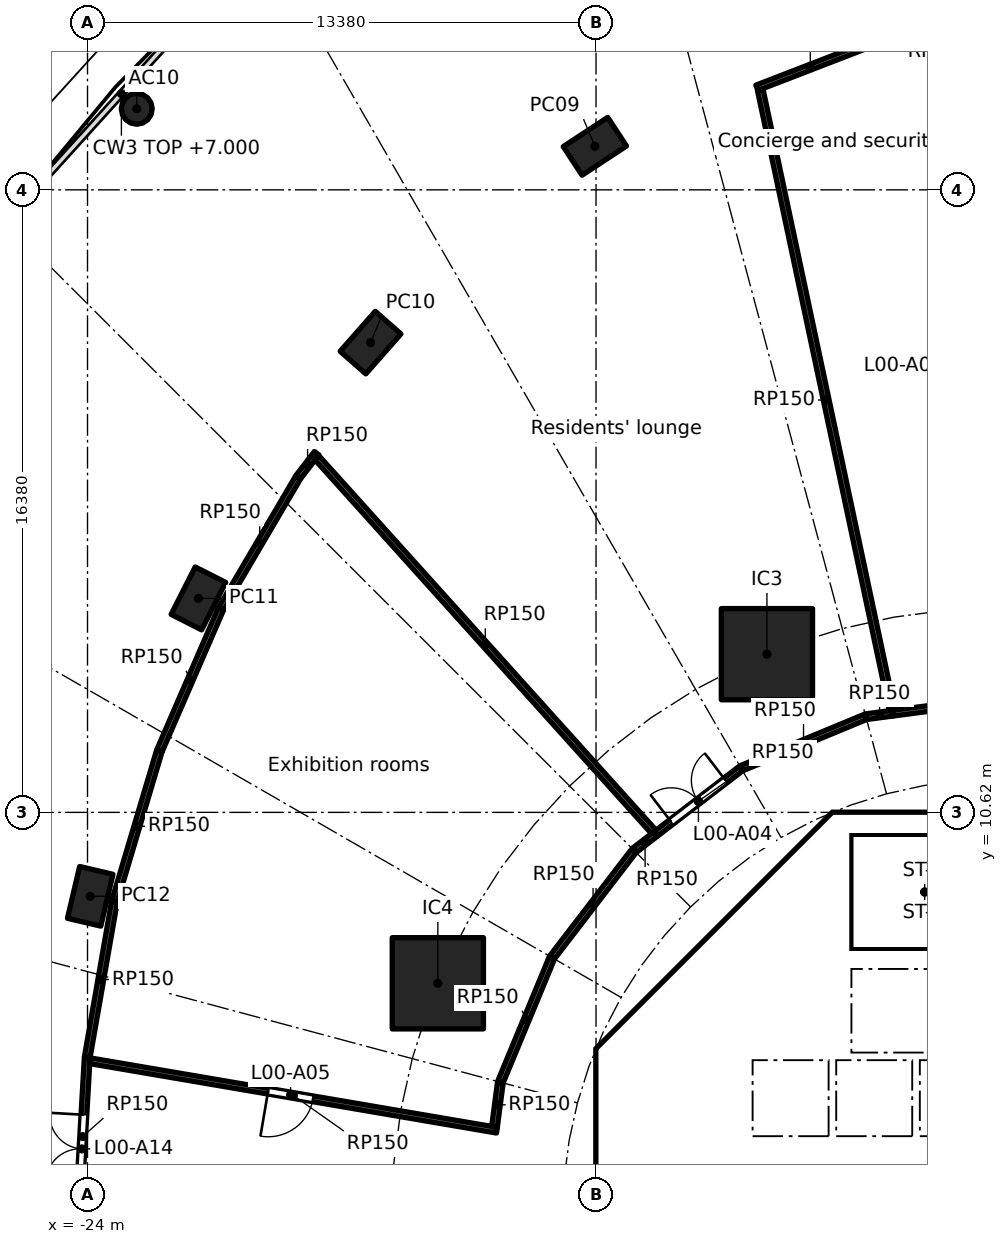
"""IFC4 building model, lengths in metres.
Left out: names, types, materials, properties, quantities, classifications, styles, units other than length and angle.
Written with IfcOpenShell. Run it as: python <this file> out.ifc"""

import sys

from ifc_helpers import new_model, si_unit, direction, frame, frame_2d, origin, origin_2d, place, context, subcontext, project, spatial, polyline, rectangle, hollow_rectangle, hollow_circle, outline, extrude, element, fill, save


model = new_model("IFC4")
c1 = context("Model", 3, precision=1e-05, world=origin(), true_north=direction((0.0, 1.0)))
c2 = subcontext(c1, "Body", "Model", "MODEL_VIEW")
j1 = project(units=[si_unit("LENGTHUNIT", "METRE"), si_unit("PLANEANGLEUNIT", "RADIAN")], contexts=[c1])
p1 = place(None, origin())
s1 = spatial("IfcSite", under=j1, at=p1, CompositionType="ELEMENT")
p2 = place(p1, origin())
s2 = spatial("IfcBuilding", under=s1, at=p2, CompositionType="ELEMENT")
p3 = place(p2, origin())
s3 = spatial("IfcBuildingStorey", under=s2, at=p3, CompositionType="ELEMENT", Elevation=0.0)
for number, where, z_axis, x_axis in (
    (1, (-10.65, 28.146, 0.0), (0.0, 0.0, 1.0), (-0.836, -0.549, 0.0)),
    (2, (-16.552, 22.981, 0.0), (0.0, 0.0, 1.0), (-0.66, -0.751, 0.0)),
    (3, (-21.082, 16.25, 0.0), (0.0, 0.0, 1.0), (-0.452, -0.892, 0.0)),
    (4, (-23.929, 8.412, 0.0), (0.0, 0.0, 1.0), (-0.229, -0.973, 0.0)),
):
    element("IfcColumn", number, at=place(p3, frame(where, z_axis=z_axis, x_axis=x_axis)), inside=s3, PredefinedType="COLUMN", context=c2, shape_type="SweptSolid", body=[
        extrude(hollow_rectangle(XDim=1.4, YDim=0.9, WallThickness=0.05, at=origin_2d()), origin(), (0.0, 0.0, 1.0), 7.0),
    ])
for number, where, z_axis, x_axis in (
    (5, (-6.123, 14.782, 0.0), (0.0, 0.0, 1.0), (1.0, 0.0, 0.0)),
    (6, (-14.782, 6.123, 0.0), (0.0, 0.0, 1.0), (1.0, 0.0, 0.0)),
):
    element("IfcColumn", number, at=place(p3, frame(where, z_axis=z_axis, x_axis=x_axis)), inside=s3, PredefinedType="COLUMN", context=c2, shape_type="SweptSolid", body=[
        extrude(rectangle(XDim=2.4, YDim=2.4, at=origin_2d()), origin(), (0.0, 0.0, 1.0), 7.0),
    ])
p4 = place(p3, frame((-22.704, 29.133, 0.0), z_axis=(0.0, 0.0, 1.0), x_axis=(1.0, 0.0, 0.0)))
e7 = element("IfcColumn", 7, at=p4, inside=s3, PredefinedType="COLUMN", context=c2, shape_type="SweptSolid", body=[
    extrude(hollow_circle(Radius=0.406, WallThickness=0.025, at=origin_2d()), origin(), (0.0, 0.0, 1.0), 7.0),
])
p5 = place(p3, frame((3.801, 10.325, 0.0), z_axis=(0.0, 0.0, 1.0), x_axis=(-1.0, 0.0, 0.0)))
e8 = element("IfcWall", 8, at=p5, inside=s3, PredefinedType="SHEAR", context=c2, shape_type="SweptSolid", body=[
    extrude(rectangle(XDim=7.602, YDim=0.6, at=frame_2d((3.801, 0.0))), origin(), (0.0, 0.0, 1.0), 6.7),
])
p6 = place(p5, frame((0.151, 0.0, 0.0)))
e9 = element("IfcOpeningElement", 9, at=p6, cuts=e8, PredefinedType="OPENING", context=c2, shape_type="SweptSolid", body=[
    extrude(rectangle(XDim=1.1, YDim=2.1, at=frame_2d((0.55, 1.05))), frame((0.0, 0.31, 0.0), z_axis=(0.0, -1.0, 0.0), x_axis=(1.0, 0.0, 0.0)), (0.0, 0.0, 1.0), 0.62),
])
p7 = place(p3, frame((-4.613, 9.988, 0.0), z_axis=(0.0, 0.0, 1.0), x_axis=(-0.707106781187, -0.707106781187, 0.0)))
e10 = element("IfcWall", 10, at=p7, inside=s3, PredefinedType="SHEAR", context=c2, shape_type="SweptSolid", body=[
    extrude(rectangle(XDim=7.602, YDim=0.6, at=frame_2d((3.801, 0.0))), origin(), (0.0, 0.0, 1.0), 6.7),
])
p8 = place(p7, frame((0.351, 0.0, 0.0)))
e11 = element("IfcOpeningElement", 11, at=p8, cuts=e10, PredefinedType="OPENING", context=c2, shape_type="SweptSolid", body=[
    extrude(rectangle(XDim=1.1, YDim=2.1, at=frame_2d((0.55, 1.05))), frame((0.0, 0.31, 0.0), z_axis=(0.0, -1.0, 0.0), x_axis=(1.0, 0.0, 0.0)), (0.0, 0.0, 1.0), 0.62),
])
p9 = place(p3, frame((-10.325, 3.801, 0.0), z_axis=(0.0, 0.0, 1.0), x_axis=(0.0, -1.0, 0.0)))
e12 = element("IfcWall", 12, at=p9, inside=s3, PredefinedType="SHEAR", context=c2, shape_type="SweptSolid", body=[
    extrude(rectangle(XDim=7.602, YDim=0.6, at=frame_2d((3.801, 0.0))), origin(), (0.0, 0.0, 1.0), 6.7),
])
p10 = place(p9, frame((0.651, 0.0, 0.0)))
e13 = element("IfcOpeningElement", 13, at=p10, cuts=e12, PredefinedType="OPENING", context=c2, shape_type="SweptSolid", body=[
    extrude(rectangle(XDim=1.5, YDim=2.1, at=frame_2d((0.75, 1.05))), frame((0.0, 0.31, 0.0), z_axis=(0.0, -1.0, 0.0), x_axis=(1.0, 0.0, 0.0)), (0.0, 0.0, 1.0), 0.62),
])
p11 = place(p9, frame((5.451, 0.0, 0.0)))
e14 = element("IfcOpeningElement", 14, at=p11, cuts=e12, PredefinedType="OPENING", context=c2, shape_type="SweptSolid", body=[
    extrude(rectangle(XDim=1.5, YDim=2.1, at=frame_2d((0.75, 1.05))), frame((0.0, 0.31, 0.0), z_axis=(0.0, -1.0, 0.0), x_axis=(1.0, 0.0, 0.0)), (0.0, 0.0, 1.0), 0.62),
])
p12 = place(p3, frame((-5.8, 4.3, 0.0), z_axis=(0.0, 0.0, 1.0), x_axis=(0.0, 1.0, 0.0)))
e15 = element("IfcWall", 15, at=p12, inside=s3, PredefinedType="PARTITIONING", context=c2, shape_type="SweptSolid", body=[
    extrude(rectangle(XDim=3.927, YDim=0.15, at=frame_2d((1.963, 0.0))), origin(), (0.0, 0.0, 1.0), 6.7),
])
p13 = place(p12, frame((1.551, 0.0, 0.0)))
e16 = element("IfcOpeningElement", 16, at=p13, cuts=e15, PredefinedType="OPENING", context=c2, shape_type="SweptSolid", body=[
    extrude(rectangle(XDim=0.9, YDim=2.1, at=frame_2d((0.45, 1.05))), frame((0.0, 0.085, 0.0), z_axis=(0.0, -1.0, 0.0), x_axis=(1.0, 0.0, 0.0)), (0.0, 0.0, 1.0), 0.17),
])
p14 = place(p3, frame((-4.0, 4.3, 0.0), z_axis=(0.0, 0.0, 1.0), x_axis=(0.0, 1.0, 0.0)))
e17 = element("IfcWall", 17, at=p14, inside=s3, PredefinedType="SOLIDWALL", context=c2, shape_type="SweptSolid", body=[
    extrude(rectangle(XDim=2.2, YDim=0.2, at=frame_2d((1.1, 0.0))), origin(), (0.0, 0.0, 1.0), 6.7),
])
p15 = place(p14, frame((0.55, 0.0, 0.0)))
e18 = element("IfcOpeningElement", 18, at=p15, cuts=e17, PredefinedType="OPENING", context=c2, shape_type="SweptSolid", body=[
    extrude(rectangle(XDim=1.1, YDim=2.1, at=frame_2d((0.55, 1.05))), frame((0.0, 0.11, 0.0), z_axis=(0.0, -1.0, 0.0), x_axis=(1.0, 0.0, 0.0)), (0.0, 0.0, 1.0), 0.22),
])
p16 = place(p3, frame((-6.7, 2.0, 0.0), z_axis=(0.0, 0.0, 1.0), x_axis=(1.0, 0.0, 0.0)))
e19 = element("IfcWall", 19, at=p16, inside=s3, PredefinedType="SOLIDWALL", context=c2, shape_type="SweptSolid", body=[
    extrude(rectangle(XDim=13.4, YDim=0.2, at=frame_2d((6.7, 0.0))), origin(), (0.0, 0.0, 1.0), 6.7),
])
p17 = place(p16, frame((0.65, 0.0, 0.0)))
e20 = element("IfcOpeningElement", 20, at=p17, cuts=e19, PredefinedType="OPENING", context=c2, shape_type="SweptSolid", body=[
    extrude(rectangle(XDim=1.1, YDim=2.1, at=frame_2d((0.55, 1.05))), frame((0.0, 0.11, 0.0), z_axis=(0.0, -1.0, 0.0), x_axis=(1.0, 0.0, 0.0)), (0.0, 0.0, 1.0), 0.22),
])
p18 = place(p16, frame((2.85, 0.0, 0.0)))
e21 = element("IfcOpeningElement", 21, at=p18, cuts=e19, PredefinedType="OPENING", context=c2, shape_type="SweptSolid", body=[
    extrude(rectangle(XDim=1.1, YDim=2.1, at=frame_2d((0.55, 1.05))), frame((0.0, 0.11, 0.0), z_axis=(0.0, -1.0, 0.0), x_axis=(1.0, 0.0, 0.0)), (0.0, 0.0, 1.0), 0.22),
])
p19 = place(p16, frame((5.05, 0.0, 0.0)))
e22 = element("IfcOpeningElement", 22, at=p19, cuts=e19, PredefinedType="OPENING", context=c2, shape_type="SweptSolid", body=[
    extrude(rectangle(XDim=1.1, YDim=2.1, at=frame_2d((0.55, 1.05))), frame((0.0, 0.11, 0.0), z_axis=(0.0, -1.0, 0.0), x_axis=(1.0, 0.0, 0.0)), (0.0, 0.0, 1.0), 0.22),
])
p20 = place(p16, frame((7.25, 0.0, 0.0)))
e23 = element("IfcOpeningElement", 23, at=p20, cuts=e19, PredefinedType="OPENING", context=c2, shape_type="SweptSolid", body=[
    extrude(rectangle(XDim=1.1, YDim=2.1, at=frame_2d((0.55, 1.05))), frame((0.0, 0.11, 0.0), z_axis=(0.0, -1.0, 0.0), x_axis=(1.0, 0.0, 0.0)), (0.0, 0.0, 1.0), 0.22),
])
p21 = place(p16, frame((9.45, 0.0, 0.0)))
e24 = element("IfcOpeningElement", 24, at=p21, cuts=e19, PredefinedType="OPENING", context=c2, shape_type="SweptSolid", body=[
    extrude(rectangle(XDim=1.1, YDim=2.1, at=frame_2d((0.55, 1.05))), frame((0.0, 0.11, 0.0), z_axis=(0.0, -1.0, 0.0), x_axis=(1.0, 0.0, 0.0)), (0.0, 0.0, 1.0), 0.22),
])
p22 = place(p16, frame((11.65, 0.0, 0.0)))
e25 = element("IfcOpeningElement", 25, at=p22, cuts=e19, PredefinedType="OPENING", context=c2, shape_type="SweptSolid", body=[
    extrude(rectangle(XDim=1.1, YDim=2.1, at=frame_2d((0.55, 1.05))), frame((0.0, 0.11, 0.0), z_axis=(0.0, -1.0, 0.0), x_axis=(1.0, 0.0, 0.0)), (0.0, 0.0, 1.0), 0.22),
])
p23 = place(p3, origin())
e26 = element("IfcWall", 26, at=p23, inside=s3, PredefinedType="SHEAR", context=c2, shape_type="SweptSolid", body=[
    extrude(outline(polyline([(-10.2, 4.825), (-9.776, 4.401), (-10.025, 4.152), (-10.025, 3.801), (-10.625, 3.801), (-10.625, 4.401), (-10.2, 4.825)])), origin(), (0.0, 0.0, 1.0), 6.7),
])
p24 = place(p3, origin())
e27 = element("IfcWall", 27, at=p24, inside=s3, PredefinedType="SHEAR", context=c2, shape_type="SweptSolid", body=[
    extrude(outline(polyline([(-3.801, 10.625), (-3.801, 10.025), (-4.152, 10.025), (-4.401, 9.776), (-4.825, 10.2), (-4.401, 10.625), (-3.801, 10.625)])), origin(), (0.0, 0.0, 1.0), 6.7),
])
p25 = place(p3, origin())
e28 = element("IfcWall", 28, at=p25, inside=s3, PredefinedType="SOLIDWALL", context=c2, shape_type="SweptSolid", body=[
    extrude(outline(polyline([(-6.5, 2.1), (-6.7, 2.1), (-6.7, 4.3), (6.7, 4.3), (6.7, 2.1), (6.5, 2.1), (6.5, 4.1), (4.5, 4.1), (4.5, 2.1), (4.3, 2.1), (4.3, 4.1), (2.3, 4.1), (2.3, 2.1), (2.1, 2.1), (2.1, 4.1), (0.1, 4.1), (0.1, 2.1), (-0.1, 2.1), (-0.1, 4.1), (-2.1, 4.1), (-2.1, 2.1), (-2.3, 2.1), (-2.3, 4.1), (-4.3, 4.1), (-4.3, 2.1), (-4.5, 2.1), (-4.5, 4.1), (-6.5, 4.1), (-6.5, 2.1)])), origin(), (0.0, 0.0, 1.0), 6.7),
])
p26 = place(p3, frame((-10.025, 4.0, 0.0), z_axis=(0.0, 0.0, 1.0), x_axis=(1.0, 0.0, 0.0)))
e29 = element("IfcWall", 29, at=p26, inside=s3, PredefinedType="PARTITIONING", context=c2, shape_type="SweptSolid", body=[
    extrude(rectangle(XDim=3.325, YDim=0.2, at=frame_2d((1.662, 0.0))), origin(), (0.0, 0.0, 1.0), 6.7),
])
p27 = place(p3, origin())
e30 = element("IfcWall", 30, at=p27, inside=s3, PredefinedType="SOLIDWALL", context=c2, shape_type="SweptSolid", body=[
    extrude(outline(polyline([(-3.9, 7.025), (-4.1, 7.025), (-4.1, 10.025), (-3.9, 10.025), (-3.9, 7.025)])), origin(), (0.0, 0.0, 1.0), 6.7),
])
p28 = place(p3, origin())
e31 = element("IfcWall", 31, at=p28, inside=s3, PredefinedType="SOLIDWALL", context=c2, shape_type="SweptSolid", body=[
    extrude(outline(polyline([(4.1, 6.5), (-4.1, 6.5), (-4.1, 7.025), (4.1, 7.025), (4.1, 6.5)])), origin(), (0.0, 0.0, 1.0), 6.7),
])
p29 = place(p3, frame((-24.248, 0.006, 0.0), z_axis=(0.0, 0.0, 1.0), x_axis=(0.05750459233, 0.998345241818, 0.0)))
e32 = element("IfcWall", 32, at=p29, inside=s3, PredefinedType="PARTITIONING", context=c2, shape_type="SweptSolid", body=[
    extrude(rectangle(XDim=4.173, YDim=0.15, at=frame_2d((2.087, 0.0))), origin(), (0.0, 0.0, 1.0), 6.7),
])
p30 = place(p29, frame((0.862, 0.0, 0.0)))
e33 = element("IfcOpeningElement", 33, at=p30, cuts=e32, PredefinedType="OPENING", context=c2, shape_type="SweptSolid", body=[
    extrude(rectangle(XDim=1.8, YDim=2.1, at=frame_2d((0.9, 1.05))), frame((0.0, 0.085, 0.0), z_axis=(0.0, -1.0, 0.0), x_axis=(1.0, 0.0, 0.0)), (0.0, 0.0, 1.0), 0.17),
])
p31 = place(p3, frame((-23.938, 4.085, 0.0), z_axis=(0.0, 0.0, 1.0), x_axis=(0.985751332255, -0.168209128636, 0.0)))
e34 = element("IfcWall", 34, at=p31, inside=s3, PredefinedType="PARTITIONING", context=c2, shape_type="SweptSolid", body=[
    extrude(rectangle(XDim=10.865, YDim=0.15, at=frame_2d((5.433, 0.0))), origin(), (0.0, 0.0, 1.0), 6.7),
])
p32 = place(p31, frame((4.757, 0.0, 0.0)))
e35 = element("IfcOpeningElement", 35, at=p32, cuts=e34, PredefinedType="OPENING", context=c2, shape_type="SweptSolid", body=[
    extrude(rectangle(XDim=1.2, YDim=2.1, at=frame_2d((0.6, 1.05))), frame((0.0, 0.085, 0.0), z_axis=(0.0, -1.0, 0.0), x_axis=(1.0, 0.0, 0.0)), (0.0, 0.0, 1.0), 0.17),
])
p33 = place(p3, frame((-24.008, 4.175, 0.0), z_axis=(0.0, 0.0, 1.0), x_axis=(0.172163826112, 0.985068331122, 0.0)))
e36 = element("IfcWall", 36, at=p33, inside=s3, PredefinedType="PARTITIONING", context=c2, shape_type="SweptSolid", body=[
    extrude(rectangle(XDim=4.158, YDim=0.15, at=frame_2d((2.079, 0.0))), origin(), (0.0, 0.0, 1.0), 6.7),
])
p34 = place(p3, frame((-23.289, 8.283, 0.0), z_axis=(0.0, 0.0, 1.0), x_axis=(0.285840471929, 0.958277216993, 0.0)))
e37 = element("IfcWall", 37, at=p34, inside=s3, PredefinedType="PARTITIONING", context=c2, shape_type="SweptSolid", body=[
    extrude(rectangle(XDim=4.117, YDim=0.15, at=frame_2d((2.059, 0.0))), origin(), (0.0, 0.0, 1.0), 6.7),
])
p35 = place(p3, frame((-22.107, 12.24, 0.0), z_axis=(0.0, 0.0, 1.0), x_axis=(0.39758890863, 0.917563654323, 0.0)))
e38 = element("IfcWall", 38, at=p35, inside=s3, PredefinedType="PARTITIONING", context=c2, shape_type="SweptSolid", body=[
    extrude(rectangle(XDim=4.067, YDim=0.15, at=frame_2d((2.034, 0.0))), origin(), (0.0, 0.0, 1.0), 6.7),
])
p36 = place(p3, frame((-20.484, 15.984, 0.0), z_axis=(0.0, 0.0, 1.0), x_axis=(0.50633554765, 0.86233654288, 0.0)))
e39 = element("IfcWall", 39, at=p36, inside=s3, PredefinedType="PARTITIONING", context=c2, shape_type="SweptSolid", body=[
    extrude(rectangle(XDim=4.006, YDim=0.15, at=frame_2d((2.003, 0.0))), origin(), (0.0, 0.0, 1.0), 6.7),
])
p37 = place(p3, frame((-18.448, 19.45, 0.0), z_axis=(0.0, 0.0, 1.0), x_axis=(0.610328517632, 0.792148408169, 0.0)))
e40 = element("IfcWall", 40, at=p37, inside=s3, PredefinedType="PARTITIONING", context=c2, shape_type="SweptSolid", body=[
    extrude(rectangle(XDim=0.783, YDim=0.15, at=frame_2d((0.391, 0.0))), origin(), (0.0, 0.0, 1.0), 6.7),
])
p38 = place(p3, frame((-17.966, 19.953, 0.0), z_axis=(0.0, 0.0, 1.0), x_axis=(0.669125575908, -0.743149354885, 0.0)))
e41 = element("IfcWall", 41, at=p38, inside=s3, PredefinedType="PARTITIONING", context=c2, shape_type="SweptSolid", body=[
    extrude(rectangle(XDim=13.249, YDim=0.15, at=frame_2d((6.624, 0.0))), origin(), (0.0, 0.0, 1.0), 6.7),
])
p39 = place(p3, frame((-13.292, 2.344, 0.0), z_axis=(0.0, 0.0, 1.0), x_axis=(0.130610530264, 0.99143375441, 0.0)))
e42 = element("IfcWall", 42, at=p39, inside=s3, PredefinedType="PARTITIONING", context=c2, shape_type="SweptSolid", body=[
    extrude(rectangle(XDim=1.174, YDim=0.15, at=frame_2d((0.587, 0.0))), origin(), (0.0, 0.0, 1.0), 6.7),
])
p40 = place(p3, frame((-13.132, 3.531, 0.0), z_axis=(0.0, 0.0, 1.0), x_axis=(0.382677866108, 0.923881838111, 0.0)))
e43 = element("IfcWall", 43, at=p40, inside=s3, PredefinedType="PARTITIONING", context=c2, shape_type="SweptSolid", body=[
    extrude(rectangle(XDim=3.527, YDim=0.15, at=frame_2d((1.763, 0.0))), origin(), (0.0, 0.0, 1.0), 6.7),
])
p41 = place(p3, frame((-11.771, 6.809, 0.0), z_axis=(0.0, 0.0, 1.0), x_axis=(0.608736710054, 0.793372307201, 0.0)))
e44 = element("IfcWall", 44, at=p41, inside=s3, PredefinedType="PARTITIONING", context=c2, shape_type="SweptSolid", body=[
    extrude(rectangle(XDim=3.527, YDim=0.15, at=frame_2d((1.763, 0.0))), origin(), (0.0, 0.0, 1.0), 6.7),
])
p42 = place(p3, frame((-9.607, 9.624, 0.0), z_axis=(0.0, 0.0, 1.0), x_axis=(0.793399175387, 0.608701690893, 0.0)))
e45 = element("IfcWall", 45, at=p42, inside=s3, PredefinedType="PARTITIONING", context=c2, shape_type="SweptSolid", body=[
    extrude(rectangle(XDim=0.702, YDim=0.15, at=frame_2d((0.351, 0.0))), origin(), (0.0, 0.0, 1.0), 6.7),
])
p43 = place(p3, frame((-9.05, 10.051, 0.0), z_axis=(0.0, 0.0, 1.0), x_axis=(0.793365630445, 0.608745411834, 0.0)))
e46 = element("IfcWall", 46, at=p43, inside=s3, PredefinedType="PARTITIONING", context=c2, shape_type="SweptSolid", body=[
    extrude(rectangle(XDim=2.825, YDim=0.15, at=frame_2d((1.412, 0.0))), origin(), (0.0, 0.0, 1.0), 6.7),
])
p44 = place(p43, frame((0.518, 0.0, 0.0)))
e47 = element("IfcOpeningElement", 47, at=p44, cuts=e46, PredefinedType="OPENING", context=c2, shape_type="SweptSolid", body=[
    extrude(rectangle(XDim=1.8, YDim=2.1, at=frame_2d((0.9, 1.05))), frame((0.0, 0.085, 0.0), z_axis=(0.0, -1.0, 0.0), x_axis=(1.0, 0.0, 0.0)), (0.0, 0.0, 1.0), 0.17),
])
p45 = place(p3, frame((-6.789, 11.782, 0.0), z_axis=(0.0, 0.0, 1.0), x_axis=(0.923881838111, 0.382677866108, 0.0)))
e48 = element("IfcWall", 48, at=p45, inside=s3, PredefinedType="PARTITIONING", context=c2, shape_type="SweptSolid", body=[
    extrude(rectangle(XDim=3.527, YDim=0.15, at=frame_2d((1.763, 0.0))), origin(), (0.0, 0.0, 1.0), 6.7),
])
p46 = place(p3, frame((-6.386, 29.685, 0.0), z_axis=(0.0, 0.0, 1.0), x_axis=(0.932843334817, 0.360282268074, 0.0)))
e49 = element("IfcWall", 49, at=p46, inside=s3, PredefinedType="PARTITIONING", context=c2, shape_type="SweptSolid", body=[
    extrude(rectangle(XDim=3.012, YDim=0.15, at=frame_2d((1.506, 0.0))), origin(), (0.0, 0.0, 1.0), 6.7),
])
p47 = place(p3, frame((-3.508, 13.138, 0.0), z_axis=(0.0, 0.0, 1.0), x_axis=(0.991460212813, 0.130409533429, 0.0)))
e50 = element("IfcWall", 50, at=p47, inside=s3, PredefinedType="PARTITIONING", context=c2, shape_type="SweptSolid", body=[
    extrude(rectangle(XDim=0.702, YDim=0.15, at=frame_2d((0.351, 0.0))), origin(), (0.0, 0.0, 1.0), 6.7),
])
p48 = place(p3, frame((-2.828, 13.303, 0.0), z_axis=(0.0, 0.0, 1.0), x_axis=(-0.207924325278, 0.978144915111, 0.0)))
e51 = element("IfcWall", 51, at=p48, inside=s3, PredefinedType="PARTITIONING", context=c2, shape_type="SweptSolid", body=[
    extrude(rectangle(XDim=16.699, YDim=0.15, at=frame_2d((8.35, 0.0))), origin(), (0.0, 0.0, 1.0), 6.7),
])
p49 = place(p3, frame((-2.812, 13.23, 0.0), z_axis=(0.0, 0.0, 1.0), x_axis=(0.991442947496, 0.130540728744, 0.0)))
e52 = element("IfcWall", 52, at=p49, inside=s3, PredefinedType="PARTITIONING", context=c2, shape_type="SweptSolid", body=[
    extrude(rectangle(XDim=2.198, YDim=0.15, at=frame_2d((1.099, 0.0))), origin(), (0.0, 0.0, 1.0), 6.7),
])
p50 = place(p17, origin())
e53 = element("IfcDoor", 53, at=p50, inside=s3, OperationType="DOUBLE_DOOR_SLIDING", PredefinedType="DOOR", context=c2, shape_type="SweptSolid", body=[
    extrude(rectangle(XDim=1.1, YDim=2.1, at=frame_2d((0.55, 1.05))), frame((0.0, 0.025, 0.0), z_axis=(0.0, -1.0, 0.0), x_axis=(1.0, 0.0, 0.0)), (0.0, 0.0, 1.0), 0.05),
])
fill(e20, e53)
p51 = place(p18, origin())
e54 = element("IfcDoor", 54, at=p51, inside=s3, OperationType="DOUBLE_DOOR_SLIDING", PredefinedType="DOOR", context=c2, shape_type="SweptSolid", body=[
    extrude(rectangle(XDim=1.1, YDim=2.1, at=frame_2d((0.55, 1.05))), frame((0.0, 0.025, 0.0), z_axis=(0.0, -1.0, 0.0), x_axis=(1.0, 0.0, 0.0)), (0.0, 0.0, 1.0), 0.05),
])
fill(e21, e54)
p52 = place(p15, origin())
e55 = element("IfcDoor", 55, at=p52, inside=s3, OperationType="DOUBLE_DOOR_SLIDING", PredefinedType="DOOR", context=c2, shape_type="SweptSolid", body=[
    extrude(rectangle(XDim=1.1, YDim=2.1, at=frame_2d((0.55, 1.05))), frame((0.0, 0.025, 0.0), z_axis=(0.0, -1.0, 0.0), x_axis=(1.0, 0.0, 0.0)), (0.0, 0.0, 1.0), 0.05),
])
fill(e18, e55)
p53 = place(p13, origin())
e56 = element("IfcDoor", 56, at=p53, inside=s3, OperationType="SINGLE_SWING_RIGHT", PredefinedType="DOOR", context=c2, shape_type="SweptSolid", body=[
    extrude(rectangle(XDim=0.9, YDim=2.1, at=frame_2d((0.45, 1.05))), frame((0.0, 0.025, 0.0), z_axis=(0.0, -1.0, 0.0), x_axis=(1.0, 0.0, 0.0)), (0.0, 0.0, 1.0), 0.05),
])
fill(e16, e56)
p54 = place(p10, origin())
e57 = element("IfcDoor", 57, at=p54, inside=s3, OperationType="DOUBLE_DOOR_SINGLE_SWING", PredefinedType="DOOR", context=c2, shape_type="SweptSolid", body=[
    extrude(rectangle(XDim=1.5, YDim=2.1, at=frame_2d((0.75, 1.05))), frame((0.0, 0.025, 0.0), z_axis=(0.0, -1.0, 0.0), x_axis=(1.0, 0.0, 0.0)), (0.0, 0.0, 1.0), 0.05),
])
fill(e13, e57)
p55 = place(p8, origin())
e58 = element("IfcDoor", 58, at=p55, inside=s3, OperationType="SINGLE_SWING_LEFT", PredefinedType="DOOR", context=c2, shape_type="SweptSolid", body=[
    extrude(rectangle(XDim=1.1, YDim=2.1, at=frame_2d((0.55, 1.05))), frame((0.0, 0.025, 0.0), z_axis=(0.0, -1.0, 0.0), x_axis=(1.0, 0.0, 0.0)), (0.0, 0.0, 1.0), 0.05),
])
fill(e11, e58)
p56 = place(p44, origin())
e59 = element("IfcDoor", 59, at=p56, inside=s3, OperationType="DOUBLE_DOOR_SINGLE_SWING", PredefinedType="DOOR", context=c2, shape_type="SweptSolid", body=[
    extrude(rectangle(XDim=1.8, YDim=2.1, at=frame_2d((0.9, 1.05))), frame((0.0, 0.025, 0.0), z_axis=(0.0, -1.0, 0.0), x_axis=(1.0, 0.0, 0.0)), (0.0, 0.0, 1.0), 0.05),
])
fill(e47, e59)
p57 = place(p32, frame((1.2, 0.0, 0.0), x_axis=(-1.0, 0.0, 0.0)))
e60 = element("IfcDoor", 60, at=p57, inside=s3, OperationType="SINGLE_SWING_RIGHT", PredefinedType="DOOR", context=c2, shape_type="SweptSolid", body=[
    extrude(rectangle(XDim=1.2, YDim=2.1, at=frame_2d((0.6, 1.05))), frame((0.0, 0.025, 0.0), z_axis=(0.0, -1.0, 0.0), x_axis=(1.0, 0.0, 0.0)), (0.0, 0.0, 1.0), 0.05),
])
fill(e35, e60)
p58 = place(p30, origin())
e61 = element("IfcDoor", 61, at=p58, inside=s3, OperationType="DOUBLE_DOOR_SINGLE_SWING", PredefinedType="DOOR", context=c2, shape_type="SweptSolid", body=[
    extrude(rectangle(XDim=1.8, YDim=2.1, at=frame_2d((0.9, 1.05))), frame((0.0, 0.025, 0.0), z_axis=(0.0, -1.0, 0.0), x_axis=(1.0, 0.0, 0.0)), (0.0, 0.0, 1.0), 0.05),
])
fill(e33, e61)
save(model, sys.argv[1])
